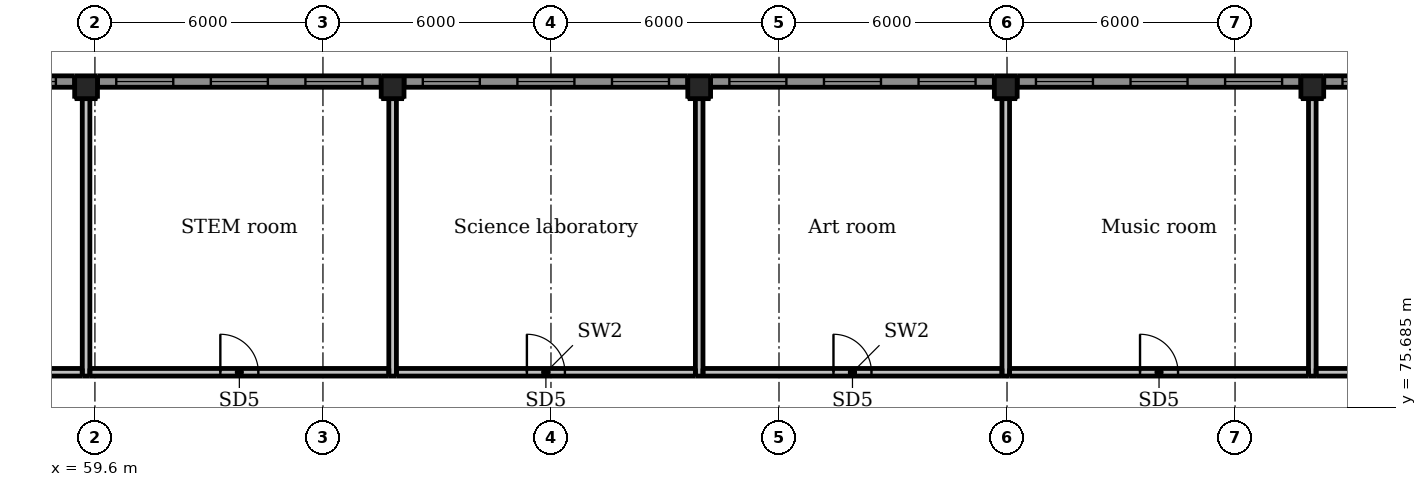
"""IFC4 building model, lengths in metres.
Left out: names, types, materials, properties, quantities, classifications, styles, units other than length and angle.
Written with IfcOpenShell. Run it as: python <this file> out.ifc"""

import sys

from ifc_helpers import new_model, si_unit, direction, frame, frame_2d, origin, origin_2d, place, context, subcontext, project, spatial, rectangle, extrude, element, fill, save


model = new_model("IFC4")
c1 = context("Model", 3, precision=1e-05, world=origin(), true_north=direction((0.0, 1.0)))
c2 = subcontext(c1, "Body", "Model", "MODEL_VIEW")
j1 = project(units=[si_unit("LENGTHUNIT", "METRE"), si_unit("PLANEANGLEUNIT", "RADIAN")], contexts=[c1])
p1 = place(None, origin())
s1 = spatial("IfcSite", under=j1, at=p1, CompositionType="ELEMENT")
p2 = place(p1, origin())
s2 = spatial("IfcBuilding", under=s1, at=p2, CompositionType="ELEMENT")
p3 = place(p2, frame((0.0, 0.0, 5.5)))
s3 = spatial("IfcBuildingStorey", under=s2, at=p3, CompositionType="ELEMENT", Elevation=5.5)
for number, where, z_axis, x_axis in (
    (1, (59.367, 84.1, -0.3), (0.0, 0.0, 1.0), (1.0, 0.0, 0.0)),
    (2, (67.433, 84.1, -0.3), (0.0, 0.0, 1.0), (1.0, 0.0, 0.0)),
    (3, (75.5, 84.1, -0.3), (0.0, 0.0, 1.0), (1.0, 0.0, 0.0)),
    (4, (83.567, 84.1, -0.3), (0.0, 0.0, 1.0), (1.0, 0.0, 0.0)),
    (5, (91.633, 84.1, -0.3), (0.0, 0.0, 1.0), (1.0, 0.0, 0.0)),
):
    element("IfcColumn", number, at=place(p3, frame(where, z_axis=z_axis, x_axis=x_axis)), inside=s3, PredefinedType="COLUMN", context=c2, shape_type="SweptSolid", body=[
        extrude(rectangle(XDim=0.6, YDim=0.6, at=origin_2d()), origin(), (0.0, 0.0, 1.0), 4.5),
    ])
p4 = place(p3, frame((51.6, 84.25, 0.0), z_axis=(0.0, 0.0, 1.0), x_axis=(1.0, 0.0, 0.0)))
e6 = element("IfcWall", 6, at=p4, inside=s3, PredefinedType="SOLIDWALL", context=c2, shape_type="SweptSolid", body=[
    extrude(rectangle(XDim=7.467, YDim=0.3, at=frame_2d((3.733, 0.0))), origin(), (0.0, 0.0, 1.0), 3.3),
])
p5 = place(p4, frame((0.494, 0.0, 0.9)))
e7 = element("IfcOpeningElement", 7, at=p5, cuts=e6, PredefinedType="OPENING", context=c2, shape_type="SweptSolid", body=[
    extrude(rectangle(XDim=1.5, YDim=1.5, at=frame_2d((0.75, 0.75))), frame((0.0, 0.16, 0.0), z_axis=(0.0, -1.0, 0.0), x_axis=(1.0, 0.0, 0.0)), (0.0, 0.0, 1.0), 0.32),
])
p6 = place(p4, frame((2.983, 0.0, 0.9)))
e8 = element("IfcOpeningElement", 8, at=p6, cuts=e6, PredefinedType="OPENING", context=c2, shape_type="SweptSolid", body=[
    extrude(rectangle(XDim=1.5, YDim=1.5, at=frame_2d((0.75, 0.75))), frame((0.0, 0.16, 0.0), z_axis=(0.0, -1.0, 0.0), x_axis=(1.0, 0.0, 0.0)), (0.0, 0.0, 1.0), 0.32),
])
p7 = place(p4, frame((5.472, 0.0, 0.9)))
e9 = element("IfcOpeningElement", 9, at=p7, cuts=e6, PredefinedType="OPENING", context=c2, shape_type="SweptSolid", body=[
    extrude(rectangle(XDim=1.5, YDim=1.5, at=frame_2d((0.75, 0.75))), frame((0.0, 0.16, 0.0), z_axis=(0.0, -1.0, 0.0), x_axis=(1.0, 0.0, 0.0)), (0.0, 0.0, 1.0), 0.32),
])
p8 = place(p3, frame((59.667, 84.25, 0.0), z_axis=(0.0, 0.0, 1.0), x_axis=(1.0, 0.0, 0.0)))
e10 = element("IfcWall", 10, at=p8, inside=s3, PredefinedType="SOLIDWALL", context=c2, shape_type="SweptSolid", body=[
    extrude(rectangle(XDim=7.466, YDim=0.3, at=frame_2d((3.733, 0.0))), origin(), (0.0, 0.0, 1.0), 3.3),
])
p9 = place(p8, frame((0.494, 0.0, 0.9)))
e11 = element("IfcOpeningElement", 11, at=p9, cuts=e10, PredefinedType="OPENING", context=c2, shape_type="SweptSolid", body=[
    extrude(rectangle(XDim=1.5, YDim=1.5, at=frame_2d((0.75, 0.75))), frame((0.0, 0.16, 0.0), z_axis=(0.0, -1.0, 0.0), x_axis=(1.0, 0.0, 0.0)), (0.0, 0.0, 1.0), 0.32),
])
p10 = place(p8, frame((2.983, 0.0, 0.9)))
e12 = element("IfcOpeningElement", 12, at=p10, cuts=e10, PredefinedType="OPENING", context=c2, shape_type="SweptSolid", body=[
    extrude(rectangle(XDim=1.5, YDim=1.5, at=frame_2d((0.75, 0.75))), frame((0.0, 0.16, 0.0), z_axis=(0.0, -1.0, 0.0), x_axis=(1.0, 0.0, 0.0)), (0.0, 0.0, 1.0), 0.32),
])
p11 = place(p8, frame((5.472, 0.0, 0.9)))
e13 = element("IfcOpeningElement", 13, at=p11, cuts=e10, PredefinedType="OPENING", context=c2, shape_type="SweptSolid", body=[
    extrude(rectangle(XDim=1.5, YDim=1.5, at=frame_2d((0.75, 0.75))), frame((0.0, 0.16, 0.0), z_axis=(0.0, -1.0, 0.0), x_axis=(1.0, 0.0, 0.0)), (0.0, 0.0, 1.0), 0.32),
])
p12 = place(p3, frame((67.733, 84.25, 0.0), z_axis=(0.0, 0.0, 1.0), x_axis=(1.0, 0.0, 0.0)))
e14 = element("IfcWall", 14, at=p12, inside=s3, PredefinedType="SOLIDWALL", context=c2, shape_type="SweptSolid", body=[
    extrude(rectangle(XDim=7.467, YDim=0.3, at=frame_2d((3.733, 0.0))), origin(), (0.0, 0.0, 1.0), 3.3),
])
p13 = place(p12, frame((0.494, 0.0, 0.9)))
e15 = element("IfcOpeningElement", 15, at=p13, cuts=e14, PredefinedType="OPENING", context=c2, shape_type="SweptSolid", body=[
    extrude(rectangle(XDim=1.5, YDim=1.5, at=frame_2d((0.75, 0.75))), frame((0.0, 0.16, 0.0), z_axis=(0.0, -1.0, 0.0), x_axis=(1.0, 0.0, 0.0)), (0.0, 0.0, 1.0), 0.32),
])
p14 = place(p12, frame((2.983, 0.0, 0.9)))
e16 = element("IfcOpeningElement", 16, at=p14, cuts=e14, PredefinedType="OPENING", context=c2, shape_type="SweptSolid", body=[
    extrude(rectangle(XDim=1.5, YDim=1.5, at=frame_2d((0.75, 0.75))), frame((0.0, 0.16, 0.0), z_axis=(0.0, -1.0, 0.0), x_axis=(1.0, 0.0, 0.0)), (0.0, 0.0, 1.0), 0.32),
])
p15 = place(p12, frame((5.472, 0.0, 0.9)))
e17 = element("IfcOpeningElement", 17, at=p15, cuts=e14, PredefinedType="OPENING", context=c2, shape_type="SweptSolid", body=[
    extrude(rectangle(XDim=1.5, YDim=1.5, at=frame_2d((0.75, 0.75))), frame((0.0, 0.16, 0.0), z_axis=(0.0, -1.0, 0.0), x_axis=(1.0, 0.0, 0.0)), (0.0, 0.0, 1.0), 0.32),
])
p16 = place(p3, frame((75.8, 84.25, 0.0), z_axis=(0.0, 0.0, 1.0), x_axis=(1.0, 0.0, 0.0)))
e18 = element("IfcWall", 18, at=p16, inside=s3, PredefinedType="SOLIDWALL", context=c2, shape_type="SweptSolid", body=[
    extrude(rectangle(XDim=7.467, YDim=0.3, at=frame_2d((3.733, 0.0))), origin(), (0.0, 0.0, 1.0), 3.3),
])
p17 = place(p16, frame((0.494, 0.0, 0.9)))
e19 = element("IfcOpeningElement", 19, at=p17, cuts=e18, PredefinedType="OPENING", context=c2, shape_type="SweptSolid", body=[
    extrude(rectangle(XDim=1.5, YDim=1.5, at=frame_2d((0.75, 0.75))), frame((0.0, 0.16, 0.0), z_axis=(0.0, -1.0, 0.0), x_axis=(1.0, 0.0, 0.0)), (0.0, 0.0, 1.0), 0.32),
])
p18 = place(p16, frame((2.983, 0.0, 0.9)))
e20 = element("IfcOpeningElement", 20, at=p18, cuts=e18, PredefinedType="OPENING", context=c2, shape_type="SweptSolid", body=[
    extrude(rectangle(XDim=1.5, YDim=1.5, at=frame_2d((0.75, 0.75))), frame((0.0, 0.16, 0.0), z_axis=(0.0, -1.0, 0.0), x_axis=(1.0, 0.0, 0.0)), (0.0, 0.0, 1.0), 0.32),
])
p19 = place(p16, frame((5.472, 0.0, 0.9)))
e21 = element("IfcOpeningElement", 21, at=p19, cuts=e18, PredefinedType="OPENING", context=c2, shape_type="SweptSolid", body=[
    extrude(rectangle(XDim=1.5, YDim=1.5, at=frame_2d((0.75, 0.75))), frame((0.0, 0.16, 0.0), z_axis=(0.0, -1.0, 0.0), x_axis=(1.0, 0.0, 0.0)), (0.0, 0.0, 1.0), 0.32),
])
p20 = place(p3, frame((83.867, 84.25, 0.0), z_axis=(0.0, 0.0, 1.0), x_axis=(1.0, 0.0, 0.0)))
e22 = element("IfcWall", 22, at=p20, inside=s3, PredefinedType="SOLIDWALL", context=c2, shape_type="SweptSolid", body=[
    extrude(rectangle(XDim=7.466, YDim=0.3, at=frame_2d((3.733, 0.0))), origin(), (0.0, 0.0, 1.0), 3.3),
])
p21 = place(p20, frame((0.494, 0.0, 0.9)))
e23 = element("IfcOpeningElement", 23, at=p21, cuts=e22, PredefinedType="OPENING", context=c2, shape_type="SweptSolid", body=[
    extrude(rectangle(XDim=1.5, YDim=1.5, at=frame_2d((0.75, 0.75))), frame((0.0, 0.16, 0.0), z_axis=(0.0, -1.0, 0.0), x_axis=(1.0, 0.0, 0.0)), (0.0, 0.0, 1.0), 0.32),
])
p22 = place(p20, frame((2.983, 0.0, 0.9)))
e24 = element("IfcOpeningElement", 24, at=p22, cuts=e22, PredefinedType="OPENING", context=c2, shape_type="SweptSolid", body=[
    extrude(rectangle(XDim=1.5, YDim=1.5, at=frame_2d((0.75, 0.75))), frame((0.0, 0.16, 0.0), z_axis=(0.0, -1.0, 0.0), x_axis=(1.0, 0.0, 0.0)), (0.0, 0.0, 1.0), 0.32),
])
p23 = place(p20, frame((5.472, 0.0, 0.9)))
e25 = element("IfcOpeningElement", 25, at=p23, cuts=e22, PredefinedType="OPENING", context=c2, shape_type="SweptSolid", body=[
    extrude(rectangle(XDim=1.5, YDim=1.5, at=frame_2d((0.75, 0.75))), frame((0.0, 0.16, 0.0), z_axis=(0.0, -1.0, 0.0), x_axis=(1.0, 0.0, 0.0)), (0.0, 0.0, 1.0), 0.32),
])
p24 = place(p3, frame((91.933, 84.25, 0.0), z_axis=(0.0, 0.0, 1.0), x_axis=(1.0, 0.0, 0.0)))
e26 = element("IfcWall", 26, at=p24, inside=s3, PredefinedType="SOLIDWALL", context=c2, shape_type="SweptSolid", body=[
    extrude(rectangle(XDim=7.467, YDim=0.3, at=frame_2d((3.733, 0.0))), origin(), (0.0, 0.0, 1.0), 3.3),
])
p25 = place(p24, frame((0.494, 0.0, 0.9)))
e27 = element("IfcOpeningElement", 27, at=p25, cuts=e26, PredefinedType="OPENING", context=c2, shape_type="SweptSolid", body=[
    extrude(rectangle(XDim=1.5, YDim=1.5, at=frame_2d((0.75, 0.75))), frame((0.0, 0.16, 0.0), z_axis=(0.0, -1.0, 0.0), x_axis=(1.0, 0.0, 0.0)), (0.0, 0.0, 1.0), 0.32),
])
p26 = place(p24, frame((2.983, 0.0, 0.9)))
e28 = element("IfcOpeningElement", 28, at=p26, cuts=e26, PredefinedType="OPENING", context=c2, shape_type="SweptSolid", body=[
    extrude(rectangle(XDim=1.5, YDim=1.5, at=frame_2d((0.75, 0.75))), frame((0.0, 0.16, 0.0), z_axis=(0.0, -1.0, 0.0), x_axis=(1.0, 0.0, 0.0)), (0.0, 0.0, 1.0), 0.32),
])
p27 = place(p24, frame((5.472, 0.0, 0.9)))
e29 = element("IfcOpeningElement", 29, at=p27, cuts=e26, PredefinedType="OPENING", context=c2, shape_type="SweptSolid", body=[
    extrude(rectangle(XDim=1.5, YDim=1.5, at=frame_2d((0.75, 0.75))), frame((0.0, 0.16, 0.0), z_axis=(0.0, -1.0, 0.0), x_axis=(1.0, 0.0, 0.0)), (0.0, 0.0, 1.0), 0.32),
])
p28 = place(p3, frame((51.6, 76.6, 0.0), z_axis=(0.0, 0.0, 1.0), x_axis=(1.0, 0.0, 0.0)))
e30 = element("IfcWall", 30, at=p28, inside=s3, PredefinedType="PARTITIONING", context=c2, shape_type="SweptSolid", body=[
    extrude(rectangle(XDim=7.667, YDim=0.2, at=frame_2d((3.833, 0.0))), origin(), (0.0, 0.0, 1.0), 3.1),
])
p29 = place(p28, frame((3.333, 0.0, 0.0)))
e31 = element("IfcOpeningElement", 31, at=p29, cuts=e30, PredefinedType="OPENING", context=c2, shape_type="SweptSolid", body=[
    extrude(rectangle(XDim=1.0, YDim=2.1, at=frame_2d((0.5, 1.05))), frame((0.0, 0.11, 0.0), z_axis=(0.0, -1.0, 0.0), x_axis=(1.0, 0.0, 0.0)), (0.0, 0.0, 1.0), 0.22),
])
p30 = place(p3, frame((59.467, 76.6, 0.0), z_axis=(0.0, 0.0, 1.0), x_axis=(1.0, 0.0, 0.0)))
e32 = element("IfcWall", 32, at=p30, inside=s3, PredefinedType="PARTITIONING", context=c2, shape_type="SweptSolid", body=[
    extrude(rectangle(XDim=7.866, YDim=0.2, at=frame_2d((3.933, 0.0))), origin(), (0.0, 0.0, 1.0), 3.1),
])
p31 = place(p30, frame((3.433, 0.0, 0.0)))
e33 = element("IfcOpeningElement", 33, at=p31, cuts=e32, PredefinedType="OPENING", context=c2, shape_type="SweptSolid", body=[
    extrude(rectangle(XDim=1.0, YDim=2.1, at=frame_2d((0.5, 1.05))), frame((0.0, 0.11, 0.0), z_axis=(0.0, -1.0, 0.0), x_axis=(1.0, 0.0, 0.0)), (0.0, 0.0, 1.0), 0.22),
])
p32 = place(p3, frame((67.533, 76.6, 0.0), z_axis=(0.0, 0.0, 1.0), x_axis=(1.0, 0.0, 0.0)))
e34 = element("IfcWall", 34, at=p32, inside=s3, PredefinedType="PARTITIONING", context=c2, shape_type="SweptSolid", body=[
    extrude(rectangle(XDim=7.867, YDim=0.2, at=frame_2d((3.934, 0.0))), origin(), (0.0, 0.0, 1.0), 3.1),
])
p33 = place(p32, frame((3.434, 0.0, 0.0)))
e35 = element("IfcOpeningElement", 35, at=p33, cuts=e34, PredefinedType="OPENING", context=c2, shape_type="SweptSolid", body=[
    extrude(rectangle(XDim=1.0, YDim=2.1, at=frame_2d((0.5, 1.05))), frame((0.0, 0.11, 0.0), z_axis=(0.0, -1.0, 0.0), x_axis=(1.0, 0.0, 0.0)), (0.0, 0.0, 1.0), 0.22),
])
p34 = place(p3, frame((75.6, 76.6, 0.0), z_axis=(0.0, 0.0, 1.0), x_axis=(1.0, 0.0, 0.0)))
e36 = element("IfcWall", 36, at=p34, inside=s3, PredefinedType="PARTITIONING", context=c2, shape_type="SweptSolid", body=[
    extrude(rectangle(XDim=7.867, YDim=0.2, at=frame_2d((3.934, 0.0))), origin(), (0.0, 0.0, 1.0), 3.1),
])
p35 = place(p34, frame((3.434, 0.0, 0.0)))
e37 = element("IfcOpeningElement", 37, at=p35, cuts=e36, PredefinedType="OPENING", context=c2, shape_type="SweptSolid", body=[
    extrude(rectangle(XDim=1.0, YDim=2.1, at=frame_2d((0.5, 1.05))), frame((0.0, 0.11, 0.0), z_axis=(0.0, -1.0, 0.0), x_axis=(1.0, 0.0, 0.0)), (0.0, 0.0, 1.0), 0.22),
])
p36 = place(p3, frame((83.667, 76.6, 0.0), z_axis=(0.0, 0.0, 1.0), x_axis=(1.0, 0.0, 0.0)))
e38 = element("IfcWall", 38, at=p36, inside=s3, PredefinedType="PARTITIONING", context=c2, shape_type="SweptSolid", body=[
    extrude(rectangle(XDim=7.866, YDim=0.2, at=frame_2d((3.933, 0.0))), origin(), (0.0, 0.0, 1.0), 3.1),
])
p37 = place(p36, frame((3.433, 0.0, 0.0)))
e39 = element("IfcOpeningElement", 39, at=p37, cuts=e38, PredefinedType="OPENING", context=c2, shape_type="SweptSolid", body=[
    extrude(rectangle(XDim=1.0, YDim=2.1, at=frame_2d((0.5, 1.05))), frame((0.0, 0.11, 0.0), z_axis=(0.0, -1.0, 0.0), x_axis=(1.0, 0.0, 0.0)), (0.0, 0.0, 1.0), 0.22),
])
p38 = place(p3, frame((91.733, 76.6, 0.0), z_axis=(0.0, 0.0, 1.0), x_axis=(1.0, 0.0, 0.0)))
e40 = element("IfcWall", 40, at=p38, inside=s3, PredefinedType="PARTITIONING", context=c2, shape_type="SweptSolid", body=[
    extrude(rectangle(XDim=7.867, YDim=0.2, at=frame_2d((3.934, 0.0))), origin(), (0.0, 0.0, 1.0), 3.1),
])
p39 = place(p38, frame((3.434, 0.0, 0.0)))
e41 = element("IfcOpeningElement", 41, at=p39, cuts=e40, PredefinedType="OPENING", context=c2, shape_type="SweptSolid", body=[
    extrude(rectangle(XDim=1.0, YDim=2.1, at=frame_2d((0.5, 1.05))), frame((0.0, 0.11, 0.0), z_axis=(0.0, -1.0, 0.0), x_axis=(1.0, 0.0, 0.0)), (0.0, 0.0, 1.0), 0.22),
])
for number, where, z_axis, x_axis in (
    (42, (59.367, 76.5, 0.0), (0.0, 0.0, 1.0), (0.0, 1.0, 0.0)),
    (43, (67.433, 76.5, 0.0), (0.0, 0.0, 1.0), (0.0, 1.0, 0.0)),
    (44, (75.5, 76.5, 0.0), (0.0, 0.0, 1.0), (0.0, 1.0, 0.0)),
    (45, (83.567, 76.5, 0.0), (0.0, 0.0, 1.0), (0.0, 1.0, 0.0)),
    (46, (91.633, 76.5, 0.0), (0.0, 0.0, 1.0), (0.0, 1.0, 0.0)),
):
    element("IfcWall", number, at=place(p3, frame(where, z_axis=z_axis, x_axis=x_axis)), inside=s3, PredefinedType="PARTITIONING", context=c2, shape_type="SweptSolid", body=[
        extrude(rectangle(XDim=7.3, YDim=0.2, at=frame_2d((3.65, 0.0))), origin(), (0.0, 0.0, 1.0), 3.1),
    ])
p40 = place(p7, origin())
e47 = element("IfcWindow", 47, at=p40, inside=s3, PartitioningType="DOUBLE_PANEL_HORIZONTAL", PredefinedType="WINDOW", context=c2, shape_type="SweptSolid", body=[
    extrude(rectangle(XDim=1.5, YDim=1.5, at=frame_2d((0.75, 0.75))), frame((0.0, 0.03, 0.0), z_axis=(0.0, -1.0, 0.0), x_axis=(1.0, 0.0, 0.0)), (0.0, 0.0, 1.0), 0.06),
])
fill(e9, e47)
p41 = place(p9, origin())
e48 = element("IfcWindow", 48, at=p41, inside=s3, PartitioningType="DOUBLE_PANEL_HORIZONTAL", PredefinedType="WINDOW", context=c2, shape_type="SweptSolid", body=[
    extrude(rectangle(XDim=1.5, YDim=1.5, at=frame_2d((0.75, 0.75))), frame((0.0, 0.03, 0.0), z_axis=(0.0, -1.0, 0.0), x_axis=(1.0, 0.0, 0.0)), (0.0, 0.0, 1.0), 0.06),
])
fill(e11, e48)
p42 = place(p10, origin())
e49 = element("IfcWindow", 49, at=p42, inside=s3, PartitioningType="DOUBLE_PANEL_HORIZONTAL", PredefinedType="WINDOW", context=c2, shape_type="SweptSolid", body=[
    extrude(rectangle(XDim=1.5, YDim=1.5, at=frame_2d((0.75, 0.75))), frame((0.0, 0.03, 0.0), z_axis=(0.0, -1.0, 0.0), x_axis=(1.0, 0.0, 0.0)), (0.0, 0.0, 1.0), 0.06),
])
fill(e12, e49)
p43 = place(p11, origin())
e50 = element("IfcWindow", 50, at=p43, inside=s3, PartitioningType="DOUBLE_PANEL_HORIZONTAL", PredefinedType="WINDOW", context=c2, shape_type="SweptSolid", body=[
    extrude(rectangle(XDim=1.5, YDim=1.5, at=frame_2d((0.75, 0.75))), frame((0.0, 0.03, 0.0), z_axis=(0.0, -1.0, 0.0), x_axis=(1.0, 0.0, 0.0)), (0.0, 0.0, 1.0), 0.06),
])
fill(e13, e50)
p44 = place(p13, origin())
e51 = element("IfcWindow", 51, at=p44, inside=s3, PartitioningType="DOUBLE_PANEL_HORIZONTAL", PredefinedType="WINDOW", context=c2, shape_type="SweptSolid", body=[
    extrude(rectangle(XDim=1.5, YDim=1.5, at=frame_2d((0.75, 0.75))), frame((0.0, 0.03, 0.0), z_axis=(0.0, -1.0, 0.0), x_axis=(1.0, 0.0, 0.0)), (0.0, 0.0, 1.0), 0.06),
])
fill(e15, e51)
p45 = place(p14, origin())
e52 = element("IfcWindow", 52, at=p45, inside=s3, PartitioningType="DOUBLE_PANEL_HORIZONTAL", PredefinedType="WINDOW", context=c2, shape_type="SweptSolid", body=[
    extrude(rectangle(XDim=1.5, YDim=1.5, at=frame_2d((0.75, 0.75))), frame((0.0, 0.03, 0.0), z_axis=(0.0, -1.0, 0.0), x_axis=(1.0, 0.0, 0.0)), (0.0, 0.0, 1.0), 0.06),
])
fill(e16, e52)
p46 = place(p15, origin())
e53 = element("IfcWindow", 53, at=p46, inside=s3, PartitioningType="DOUBLE_PANEL_HORIZONTAL", PredefinedType="WINDOW", context=c2, shape_type="SweptSolid", body=[
    extrude(rectangle(XDim=1.5, YDim=1.5, at=frame_2d((0.75, 0.75))), frame((0.0, 0.03, 0.0), z_axis=(0.0, -1.0, 0.0), x_axis=(1.0, 0.0, 0.0)), (0.0, 0.0, 1.0), 0.06),
])
fill(e17, e53)
p47 = place(p17, origin())
e54 = element("IfcWindow", 54, at=p47, inside=s3, PartitioningType="DOUBLE_PANEL_HORIZONTAL", PredefinedType="WINDOW", context=c2, shape_type="SweptSolid", body=[
    extrude(rectangle(XDim=1.5, YDim=1.5, at=frame_2d((0.75, 0.75))), frame((0.0, 0.03, 0.0), z_axis=(0.0, -1.0, 0.0), x_axis=(1.0, 0.0, 0.0)), (0.0, 0.0, 1.0), 0.06),
])
fill(e19, e54)
p48 = place(p18, origin())
e55 = element("IfcWindow", 55, at=p48, inside=s3, PartitioningType="DOUBLE_PANEL_HORIZONTAL", PredefinedType="WINDOW", context=c2, shape_type="SweptSolid", body=[
    extrude(rectangle(XDim=1.5, YDim=1.5, at=frame_2d((0.75, 0.75))), frame((0.0, 0.03, 0.0), z_axis=(0.0, -1.0, 0.0), x_axis=(1.0, 0.0, 0.0)), (0.0, 0.0, 1.0), 0.06),
])
fill(e20, e55)
p49 = place(p19, origin())
e56 = element("IfcWindow", 56, at=p49, inside=s3, PartitioningType="DOUBLE_PANEL_HORIZONTAL", PredefinedType="WINDOW", context=c2, shape_type="SweptSolid", body=[
    extrude(rectangle(XDim=1.5, YDim=1.5, at=frame_2d((0.75, 0.75))), frame((0.0, 0.03, 0.0), z_axis=(0.0, -1.0, 0.0), x_axis=(1.0, 0.0, 0.0)), (0.0, 0.0, 1.0), 0.06),
])
fill(e21, e56)
p50 = place(p21, origin())
e57 = element("IfcWindow", 57, at=p50, inside=s3, PartitioningType="DOUBLE_PANEL_HORIZONTAL", PredefinedType="WINDOW", context=c2, shape_type="SweptSolid", body=[
    extrude(rectangle(XDim=1.5, YDim=1.5, at=frame_2d((0.75, 0.75))), frame((0.0, 0.03, 0.0), z_axis=(0.0, -1.0, 0.0), x_axis=(1.0, 0.0, 0.0)), (0.0, 0.0, 1.0), 0.06),
])
fill(e23, e57)
p51 = place(p22, origin())
e58 = element("IfcWindow", 58, at=p51, inside=s3, PartitioningType="DOUBLE_PANEL_HORIZONTAL", PredefinedType="WINDOW", context=c2, shape_type="SweptSolid", body=[
    extrude(rectangle(XDim=1.5, YDim=1.5, at=frame_2d((0.75, 0.75))), frame((0.0, 0.03, 0.0), z_axis=(0.0, -1.0, 0.0), x_axis=(1.0, 0.0, 0.0)), (0.0, 0.0, 1.0), 0.06),
])
fill(e24, e58)
p52 = place(p23, origin())
e59 = element("IfcWindow", 59, at=p52, inside=s3, PartitioningType="DOUBLE_PANEL_HORIZONTAL", PredefinedType="WINDOW", context=c2, shape_type="SweptSolid", body=[
    extrude(rectangle(XDim=1.5, YDim=1.5, at=frame_2d((0.75, 0.75))), frame((0.0, 0.03, 0.0), z_axis=(0.0, -1.0, 0.0), x_axis=(1.0, 0.0, 0.0)), (0.0, 0.0, 1.0), 0.06),
])
fill(e25, e59)
p53 = place(p25, origin())
e60 = element("IfcWindow", 60, at=p53, inside=s3, PartitioningType="DOUBLE_PANEL_HORIZONTAL", PredefinedType="WINDOW", context=c2, shape_type="SweptSolid", body=[
    extrude(rectangle(XDim=1.5, YDim=1.5, at=frame_2d((0.75, 0.75))), frame((0.0, 0.03, 0.0), z_axis=(0.0, -1.0, 0.0), x_axis=(1.0, 0.0, 0.0)), (0.0, 0.0, 1.0), 0.06),
])
fill(e27, e60)
p54 = place(p31, origin())
e61 = element("IfcDoor", 61, at=p54, inside=s3, OperationType="SINGLE_SWING_LEFT", PredefinedType="DOOR", context=c2, shape_type="SweptSolid", body=[
    extrude(rectangle(XDim=1.0, YDim=2.1, at=frame_2d((0.5, 1.05))), frame((0.0, 0.025, 0.0), z_axis=(0.0, -1.0, 0.0), x_axis=(1.0, 0.0, 0.0)), (0.0, 0.0, 1.0), 0.05),
])
fill(e33, e61)
p55 = place(p33, origin())
e62 = element("IfcDoor", 62, at=p55, inside=s3, OperationType="SINGLE_SWING_LEFT", PredefinedType="DOOR", context=c2, shape_type="SweptSolid", body=[
    extrude(rectangle(XDim=1.0, YDim=2.1, at=frame_2d((0.5, 1.05))), frame((0.0, 0.025, 0.0), z_axis=(0.0, -1.0, 0.0), x_axis=(1.0, 0.0, 0.0)), (0.0, 0.0, 1.0), 0.05),
])
fill(e35, e62)
p56 = place(p35, origin())
e63 = element("IfcDoor", 63, at=p56, inside=s3, OperationType="SINGLE_SWING_LEFT", PredefinedType="DOOR", context=c2, shape_type="SweptSolid", body=[
    extrude(rectangle(XDim=1.0, YDim=2.1, at=frame_2d((0.5, 1.05))), frame((0.0, 0.025, 0.0), z_axis=(0.0, -1.0, 0.0), x_axis=(1.0, 0.0, 0.0)), (0.0, 0.0, 1.0), 0.05),
])
fill(e37, e63)
p57 = place(p37, origin())
e64 = element("IfcDoor", 64, at=p57, inside=s3, OperationType="SINGLE_SWING_LEFT", PredefinedType="DOOR", context=c2, shape_type="SweptSolid", body=[
    extrude(rectangle(XDim=1.0, YDim=2.1, at=frame_2d((0.5, 1.05))), frame((0.0, 0.025, 0.0), z_axis=(0.0, -1.0, 0.0), x_axis=(1.0, 0.0, 0.0)), (0.0, 0.0, 1.0), 0.05),
])
fill(e39, e64)
save(model, sys.argv[1])
